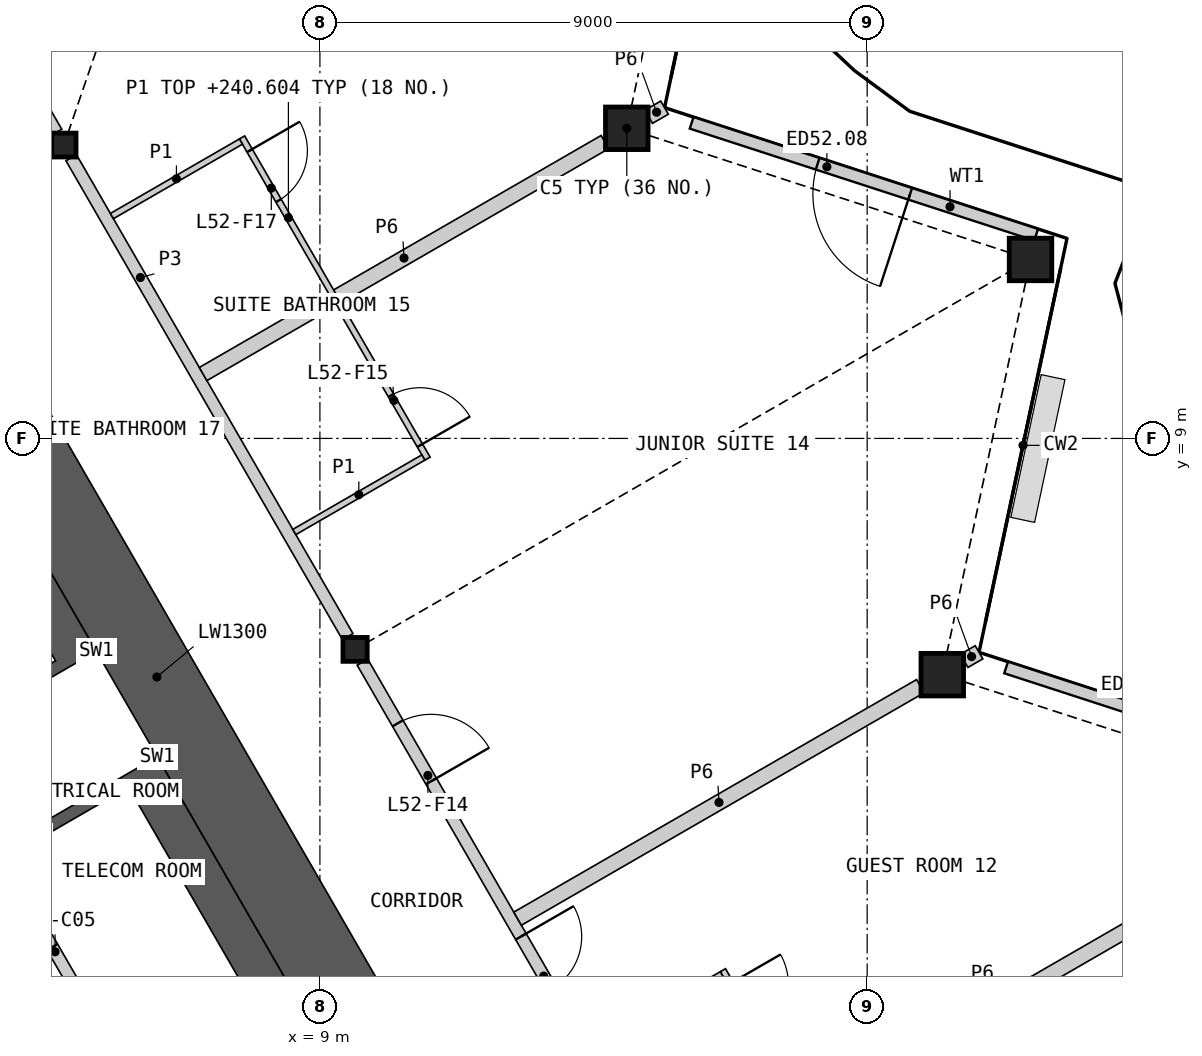
"""IFC4 building model, lengths in metres.
Left out: names, types, materials, properties, quantities, classifications, styles, units other than length and angle.
Written with IfcOpenShell. Run it as: python <this file> out.ifc"""

import sys

from ifc_helpers import new_model, si_unit, direction, frame, frame_2d, origin, origin_2d, place, context, subcontext, project, spatial, polyline, rectangle, hollow_rectangle, i_section, outline, extrude, element, fill, save


model = new_model("IFC4")
c1 = context("Model", 3, precision=1e-05, world=origin(), true_north=direction((0.0, 1.0)))
c2 = subcontext(c1, "Body", "Model", "MODEL_VIEW")
j1 = project(units=[si_unit("LENGTHUNIT", "METRE"), si_unit("PLANEANGLEUNIT", "RADIAN")], contexts=[c1])
p1 = place(None, origin())
s1 = spatial("IfcSite", under=j1, at=p1, CompositionType="ELEMENT")
p2 = place(p1, origin())
s2 = spatial("IfcBuilding", under=s1, at=p2, CompositionType="ELEMENT")
p3 = place(p2, frame((0.0, 0.0, 238.2)))
s3 = spatial("IfcBuildingStorey", under=s2, at=p3, CompositionType="ELEMENT", Elevation=238.2)
for number, where, z_axis, x_axis in (
    (1, (19.235, 5.115, 0.0), (0.0, 0.0, 1.0), (1.0, 0.0, 0.0)),
    (2, (20.687, 11.943, 0.0), (0.0, 0.0, 1.0), (1.0, 0.0, 0.0)),
    (3, (14.047, 14.101, 0.0), (0.0, 0.0, 1.0), (1.0, 0.0, 0.0)),
):
    element("IfcColumn", number, at=place(p3, frame(where, z_axis=z_axis, x_axis=x_axis)), inside=s3, PredefinedType="COLUMN", context=c2, shape_type="SweptSolid", body=[
        extrude(hollow_rectangle(XDim=0.7, YDim=0.7, WallThickness=0.045, at=origin_2d()), origin(), (0.0, 0.0, 1.0), 3.6),
    ])
for number, where, z_axis, x_axis in (
    (4, (9.578, 5.53, 0.0), (0.0, 0.0, 1.0), (1.0, 0.0, 0.0)),
    (5, (4.789, 13.825, 0.0), (0.0, 0.0, 1.0), (1.0, 0.0, 0.0)),
):
    element("IfcColumn", number, at=place(p3, frame(where, z_axis=z_axis, x_axis=x_axis)), inside=s3, PredefinedType="COLUMN", context=c2, shape_type="SweptSolid", body=[
        extrude(i_section(OverallWidth=0.399, OverallDepth=0.393, WebThickness=0.023, FlangeThickness=0.037, at=origin_2d()), origin(), (0.0, 0.0, 1.0), 3.6),
    ])
p4 = place(p3, frame((25.977, 3.383, 0.0), z_axis=(0.0, 0.0, 1.0), x_axis=(-0.951062846307, 0.308997511922, 0.0)))
e6 = element("IfcWall", 6, at=p4, inside=s3, PredefinedType="SOLIDWALL", context=c2, shape_type="SweptSolid", body=[
    extrude(rectangle(XDim=5.984, YDim=0.2, at=frame_2d((2.992, 0.0))), origin(), (0.0, 0.0, 1.0), 2.701),
])
p5 = place(p4, frame((2.206, 0.0, 0.0)))
e7 = element("IfcOpeningElement", 7, at=p5, cuts=e6, PredefinedType="OPENING", context=c2, shape_type="SweptSolid", body=[
    extrude(rectangle(XDim=1.6, YDim=2.4, at=frame_2d((0.8, 1.2))), frame((0.0, 0.11, 0.0), z_axis=(0.0, -1.0, 0.0), x_axis=(1.0, 0.0, 0.0)), (0.0, 0.0, 1.0), 0.22),
])
p6 = place(p3, frame((20.779, 12.35, 0.0), z_axis=(0.0, 0.0, 1.0), x_axis=(-0.951065383831, 0.308989701572, 0.0)))
e8 = element("IfcWall", 8, at=p6, inside=s3, PredefinedType="SOLIDWALL", context=c2, shape_type="SweptSolid", body=[
    extrude(rectangle(XDim=5.958, YDim=0.2, at=frame_2d((2.979, 0.0))), origin(), (0.0, 0.0, 1.0), 2.701),
])
p7 = place(p6, frame((2.179, 0.0, 0.0)))
e9 = element("IfcOpeningElement", 9, at=p7, cuts=e8, PredefinedType="OPENING", context=c2, shape_type="SweptSolid", body=[
    extrude(rectangle(XDim=1.6, YDim=2.4, at=frame_2d((0.8, 1.2))), frame((0.0, 0.11, 0.0), z_axis=(0.0, -1.0, 0.0), x_axis=(1.0, 0.0, 0.0)), (0.0, 0.0, 1.0), 0.22),
])
p8 = place(p3, origin())
e10 = element("IfcWall", 10, at=p8, inside=s3, PredefinedType="SHEAR", context=c2, shape_type="SweptSolid", body=[
    extrude(outline(polyline([(6.324, 3.767), (8.624, -0.217), (8.231, -0.444), (6.061, -1.697), (5.96, -1.524), (7.952, -0.374), (5.852, 3.263), (3.861, 2.113), (3.76, 2.287), (5.931, 3.54), (6.324, 3.767)])), origin(), (0.0, 0.0, 1.0), 3.25),
])
p9 = place(p3, origin())
e11 = element("IfcWall", 11, at=p9, inside=s3, PredefinedType="SHEAR", context=c2, shape_type="SweptSolid", body=[
    extrude(outline(polyline([(5.324, 5.499), (4.931, 5.272), (2.76, 4.019), (2.66, 4.192), (4.652, 5.342), (3.652, 7.074), (1.66, 5.924), (1.561, 6.097), (3.731, 7.35), (4.124, 7.577), (5.324, 5.499)])), origin(), (0.0, 0.0, 1.0), 3.25),
])
p10 = place(p3, frame((5.817, -1.476, 0.0), z_axis=(0.0, 0.0, 1.0), x_axis=(-0.500002616675, 0.866023893041, 0.0)))
e12 = element("IfcWall", 12, at=p10, inside=s3, PredefinedType="SOLIDWALL", context=c2, shape_type="SweptSolid", body=[
    extrude(rectangle(XDim=8.373, YDim=0.2, at=frame_2d((4.187, 0.0))), origin(), (0.0, 0.0, 1.0), 3.25),
])
p11 = place(p10, frame((1.537, 0.0, 0.0)))
e13 = element("IfcOpeningElement", 13, at=p11, cuts=e12, PredefinedType="OPENING", context=c2, shape_type="SweptSolid", body=[
    extrude(rectangle(XDim=0.9, YDim=2.1, at=frame_2d((0.45, 1.05))), frame((0.0, 0.11, 0.0), z_axis=(0.0, -1.0, 0.0), x_axis=(1.0, 0.0, 0.0)), (0.0, 0.0, 1.0), 0.22),
])
p12 = place(p10, frame((4.837, 0.0, 0.0)))
e14 = element("IfcOpeningElement", 14, at=p12, cuts=e12, PredefinedType="OPENING", context=c2, shape_type="SweptSolid", body=[
    extrude(rectangle(XDim=0.9, YDim=2.1, at=frame_2d((0.45, 1.05))), frame((0.0, 0.11, 0.0), z_axis=(0.0, -1.0, 0.0), x_axis=(1.0, 0.0, 0.0)), (0.0, 0.0, 1.0), 0.22),
])
p13 = place(p10, frame((6.937, 0.0, 0.0)))
e15 = element("IfcOpeningElement", 15, at=p13, cuts=e12, PredefinedType="OPENING", context=c2, shape_type="SweptSolid", body=[
    extrude(rectangle(XDim=1.1, YDim=2.1, at=frame_2d((0.55, 1.05))), frame((0.0, 0.11, 0.0), z_axis=(0.0, -1.0, 0.0), x_axis=(1.0, 0.0, 0.0)), (0.0, 0.0, 1.0), 0.22),
])
p14 = place(p3, frame((10.081, -1.441, 0.0), z_axis=(0.0, 0.0, 1.0), x_axis=(-0.500012180433, 0.866018371294, 0.0)))
e16 = element("IfcWall", 16, at=p14, inside=s3, PredefinedType="SHEAR", context=c2, shape_type="SweptSolid", body=[
    extrude(rectangle(XDim=15.05, YDim=1.3, at=frame_2d((7.525, 0.0))), origin(), (0.0, 0.0, 1.0), 3.25),
])
p15 = place(p3, frame((14.837, -3.378, 0.0), z_axis=(0.0, 0.0, 1.0), x_axis=(0.866021706022, 0.500006404657, 0.0)))
e17 = element("IfcWall", 17, at=p15, inside=s3, PredefinedType="PARTITIONING", context=c2, shape_type="SweptSolid", body=[
    extrude(rectangle(XDim=12.33, YDim=0.25, at=frame_2d((6.165, 0.0))), origin(), (0.0, 0.0, 1.0), 2.404),
])
p16 = place(p3, frame((9.699, 5.321, 0.0), z_axis=(0.0, 0.0, 1.0), x_axis=(0.49998193945, -0.866035830797, 0.0)))
e18 = element("IfcWall", 18, at=p16, inside=s3, PredefinedType="PARTITIONING", context=c2, shape_type="SweptSolid", body=[
    extrude(rectangle(XDim=9.094, YDim=0.2, at=frame_2d((4.547, 0.0))), origin(), (0.0, 0.0, 1.0), 3.25),
])
p17 = place(p16, frame((5.212, 0.0, 0.0)))
e19 = element("IfcOpeningElement", 19, at=p17, cuts=e18, PredefinedType="OPENING", context=c2, shape_type="SweptSolid", body=[
    extrude(rectangle(XDim=1.0, YDim=2.1, at=frame_2d((0.5, 1.05))), frame((0.0, 0.11, 0.0), z_axis=(0.0, -1.0, 0.0), x_axis=(1.0, 0.0, 0.0)), (0.0, 0.0, 1.0), 0.22),
])
p18 = place(p16, frame((1.162, 0.0, 0.0)))
e20 = element("IfcOpeningElement", 20, at=p18, cuts=e18, PredefinedType="OPENING", context=c2, shape_type="SweptSolid", body=[
    extrude(rectangle(XDim=1.1, YDim=2.1, at=frame_2d((0.55, 1.05))), frame((0.0, 0.11, 0.0), z_axis=(0.0, -1.0, 0.0), x_axis=(1.0, 0.0, 0.0)), (0.0, 0.0, 1.0), 0.22),
])
p19 = place(p3, frame((4.91, 13.616, 0.0), z_axis=(0.0, 0.0, 1.0), x_axis=(0.50000207303, -0.866024206917, 0.0)))
e21 = element("IfcWall", 21, at=p19, inside=s3, PredefinedType="PARTITIONING", context=c2, shape_type="SweptSolid", body=[
    extrude(rectangle(XDim=9.095, YDim=0.2, at=frame_2d((4.547, 0.0))), origin(), (0.0, 0.0, 1.0), 3.25),
])
p20 = place(p3, frame((12.251, 1.101, 0.0), z_axis=(0.0, 0.0, 1.0), x_axis=(0.866020808234, 0.500007959642, 0.0)))
e22 = element("IfcWall", 22, at=p20, inside=s3, PredefinedType="PARTITIONING", context=c2, shape_type="SweptSolid", body=[
    extrude(rectangle(XDim=7.649, YDim=0.25, at=frame_2d((3.824, 0.0))), origin(), (0.0, 0.0, 1.0), 2.404),
])
p21 = place(p3, frame((7.079, 10.059, 0.0), z_axis=(0.0, 0.0, 1.0), x_axis=(0.866033195618, 0.499986503906, 0.0)))
e23 = element("IfcWall", 23, at=p21, inside=s3, PredefinedType="PARTITIONING", context=c2, shape_type="SweptSolid", body=[
    extrude(rectangle(XDim=7.63, YDim=0.25, at=frame_2d((3.815, 0.0))), origin(), (0.0, 0.0, 1.0), 2.404),
])
p22 = place(p3, frame((1.913, 18.807, 0.0), z_axis=(0.0, 0.0, 1.0), x_axis=(0.499984524817, -0.866034338201, 0.0)))
e24 = element("IfcWall", 24, at=p22, inside=s3, PredefinedType="PARTITIONING", context=c2, shape_type="SweptSolid", body=[
    extrude(rectangle(XDim=5.51, YDim=0.2, at=frame_2d((2.755, 0.0))), origin(), (0.0, 0.0, 1.0), 3.25),
])
p23 = place(p22, frame((0.35, 0.0, 0.0)))
e25 = element("IfcOpeningElement", 25, at=p23, cuts=e24, PredefinedType="OPENING", context=c2, shape_type="SweptSolid", body=[
    extrude(rectangle(XDim=1.1, YDim=2.1, at=frame_2d((0.55, 1.05))), frame((0.0, 0.11, 0.0), z_axis=(0.0, -1.0, 0.0), x_axis=(1.0, 0.0, 0.0)), (0.0, 0.0, 1.0), 0.22),
])
p24 = place(p3, frame((14.407, 14.29, 0.0), z_axis=(0.0, 0.0, 1.0), x_axis=(0.865888485494, 0.500237074485, 0.0)))
e26 = element("IfcWall", 26, at=p24, inside=s3, PredefinedType="PARTITIONING", context=c2, shape_type="SweptSolid", body=[
    extrude(rectangle(XDim=0.301, YDim=0.25, at=frame_2d((0.15, 0.0))), origin(), (0.0, 0.0, 1.0), 2.404),
])
p25 = place(p3, frame((19.595, 5.341, 0.0), z_axis=(0.0, 0.0, 1.0), x_axis=(0.865998287773, 0.500046963369, 0.0)))
e27 = element("IfcWall", 27, at=p25, inside=s3, PredefinedType="PARTITIONING", context=c2, shape_type="SweptSolid", body=[
    extrude(rectangle(XDim=0.282, YDim=0.25, at=frame_2d((0.141, 0.0))), origin(), (0.0, 0.0, 1.0), 2.404),
])
p26 = place(p3, frame((7.719, 13.95, 0.0), z_axis=(0.0, 0.0, 1.0), x_axis=(0.500008851346, -0.866020293397, 0.0)))
e28 = element("IfcWall", 28, at=p26, inside=s3, PredefinedType="PARTITIONING", context=c2, shape_type="SweptSolid", body=[
    extrude(rectangle(XDim=6.1, YDim=0.1, at=frame_2d((3.05, 0.0))), origin(), (0.0, 0.0, 1.0), 2.404),
])
p27 = place(p26, frame((4.9, 0.0, 0.0)))
e29 = element("IfcOpeningElement", 29, at=p27, cuts=e28, PredefinedType="OPENING", context=c2, shape_type="SweptSolid", body=[
    extrude(rectangle(XDim=0.95, YDim=2.1, at=frame_2d((0.475, 1.05))), frame((0.0, 0.06, 0.0), z_axis=(0.0, -1.0, 0.0), x_axis=(1.0, 0.0, 0.0)), (0.0, 0.0, 1.0), 0.12),
])
p28 = place(p26, frame((0.25, 0.0, 0.0)))
e30 = element("IfcOpeningElement", 30, at=p28, cuts=e28, PredefinedType="OPENING", context=c2, shape_type="SweptSolid", body=[
    extrude(rectangle(XDim=0.95, YDim=2.1, at=frame_2d((0.475, 1.05))), frame((0.0, 0.06, 0.0), z_axis=(0.0, -1.0, 0.0), x_axis=(1.0, 0.0, 0.0)), (0.0, 0.0, 1.0), 0.12),
])
p29 = place(p3, frame((15.627, 0.254, 0.0), z_axis=(0.0, 0.0, 1.0), x_axis=(0.500027264788, -0.866009661879, 0.0)))
e31 = element("IfcWall", 31, at=p29, inside=s3, PredefinedType="PARTITIONING", context=c2, shape_type="SweptSolid", body=[
    extrude(rectangle(XDim=5.2, YDim=0.1, at=frame_2d((2.6, 0.0))), origin(), (0.0, 0.0, 1.0), 2.404),
])
p30 = place(p29, frame((4.0, 0.0, 0.0)))
e32 = element("IfcOpeningElement", 32, at=p30, cuts=e31, PredefinedType="OPENING", context=c2, shape_type="SweptSolid", body=[
    extrude(rectangle(XDim=0.95, YDim=2.1, at=frame_2d((0.475, 1.05))), frame((0.0, 0.06, 0.0), z_axis=(0.0, -1.0, 0.0), x_axis=(1.0, 0.0, 0.0)), (0.0, 0.0, 1.0), 0.12),
])
p31 = place(p29, frame((0.25, 0.0, 0.0)))
e33 = element("IfcOpeningElement", 33, at=p31, cuts=e31, PredefinedType="OPENING", context=c2, shape_type="SweptSolid", body=[
    extrude(rectangle(XDim=0.95, YDim=2.1, at=frame_2d((0.475, 1.05))), frame((0.0, 0.06, 0.0), z_axis=(0.0, -1.0, 0.0), x_axis=(1.0, 0.0, 0.0)), (0.0, 0.0, 1.0), 0.12),
])
p32 = place(p3, frame((13.487, -1.04, 0.0), z_axis=(0.0, 0.0, 1.0), x_axis=(0.866032905446, 0.499987006516, 0.0)))
e34 = element("IfcWall", 34, at=p32, inside=s3, PredefinedType="PARTITIONING", context=c2, shape_type="SweptSolid", body=[
    extrude(rectangle(XDim=2.45, YDim=0.1, at=frame_2d((1.225, 0.0))), origin(), (0.0, 0.0, 1.0), 2.404),
])
p33 = place(p3, frame((8.579, 7.461, 0.0), z_axis=(0.0, 0.0, 1.0), x_axis=(0.866014668023, 0.500018594424, 0.0)))
e35 = element("IfcWall", 35, at=p33, inside=s3, PredefinedType="PARTITIONING", context=c2, shape_type="SweptSolid", body=[
    extrude(rectangle(XDim=2.45, YDim=0.1, at=frame_2d((1.225, 0.0))), origin(), (0.0, 0.0, 1.0), 2.404),
])
p34 = place(p3, frame((5.579, 12.657, 0.0), z_axis=(0.0, 0.0, 1.0), x_axis=(0.866057815567, 0.499943856944, 0.0)))
e36 = element("IfcWall", 36, at=p34, inside=s3, PredefinedType="PARTITIONING", context=c2, shape_type="SweptSolid", body=[
    extrude(rectangle(XDim=2.45, YDim=0.1, at=frame_2d((1.225, 0.0))), origin(), (0.0, 0.0, 1.0), 2.404),
])
p35 = place(p7, origin())
e37 = element("IfcDoor", 37, at=p35, inside=s3, OperationType="DOUBLE_DOOR_SINGLE_SWING", PredefinedType="DOOR", context=c2, shape_type="SweptSolid", body=[
    extrude(rectangle(XDim=1.6, YDim=2.4, at=frame_2d((0.8, 1.2))), frame((0.0, 0.025, 0.0), z_axis=(0.0, -1.0, 0.0), x_axis=(1.0, 0.0, 0.0)), (0.0, 0.0, 1.0), 0.05),
])
fill(e9, e37)
p36 = place(p11, origin())
e38 = element("IfcDoor", 38, at=p36, inside=s3, OperationType="SINGLE_SWING_LEFT", PredefinedType="DOOR", context=c2, shape_type="SweptSolid", body=[
    extrude(rectangle(XDim=0.9, YDim=2.1, at=frame_2d((0.45, 1.05))), frame((0.0, 0.025, 0.0), z_axis=(0.0, -1.0, 0.0), x_axis=(1.0, 0.0, 0.0)), (0.0, 0.0, 1.0), 0.05),
])
fill(e13, e38)
p37 = place(p17, origin())
e39 = element("IfcDoor", 39, at=p37, inside=s3, OperationType="SINGLE_SWING_LEFT", PredefinedType="DOOR", context=c2, shape_type="SweptSolid", body=[
    extrude(rectangle(XDim=1.0, YDim=2.1, at=frame_2d((0.5, 1.05))), frame((0.0, 0.025, 0.0), z_axis=(0.0, -1.0, 0.0), x_axis=(1.0, 0.0, 0.0)), (0.0, 0.0, 1.0), 0.05),
])
fill(e19, e39)
p38 = place(p18, origin())
e40 = element("IfcDoor", 40, at=p38, inside=s3, OperationType="SINGLE_SWING_RIGHT", PredefinedType="DOOR", context=c2, shape_type="SweptSolid", body=[
    extrude(rectangle(XDim=1.1, YDim=2.1, at=frame_2d((0.55, 1.05))), frame((0.0, 0.025, 0.0), z_axis=(0.0, -1.0, 0.0), x_axis=(1.0, 0.0, 0.0)), (0.0, 0.0, 1.0), 0.05),
])
fill(e20, e40)
p39 = place(p27, origin())
e41 = element("IfcDoor", 41, at=p39, inside=s3, OperationType="SINGLE_SWING_RIGHT", PredefinedType="DOOR", context=c2, shape_type="SweptSolid", body=[
    extrude(rectangle(XDim=0.95, YDim=2.1, at=frame_2d((0.475, 1.05))), frame((0.0, 0.025, 0.0), z_axis=(0.0, -1.0, 0.0), x_axis=(1.0, 0.0, 0.0)), (0.0, 0.0, 1.0), 0.05),
])
fill(e29, e41)
p40 = place(p28, origin())
e42 = element("IfcDoor", 42, at=p40, inside=s3, OperationType="SINGLE_SWING_LEFT", PredefinedType="DOOR", context=c2, shape_type="SweptSolid", body=[
    extrude(rectangle(XDim=0.95, YDim=2.1, at=frame_2d((0.475, 1.05))), frame((0.0, 0.025, 0.0), z_axis=(0.0, -1.0, 0.0), x_axis=(1.0, 0.0, 0.0)), (0.0, 0.0, 1.0), 0.05),
])
fill(e30, e42)
save(model, sys.argv[1])
